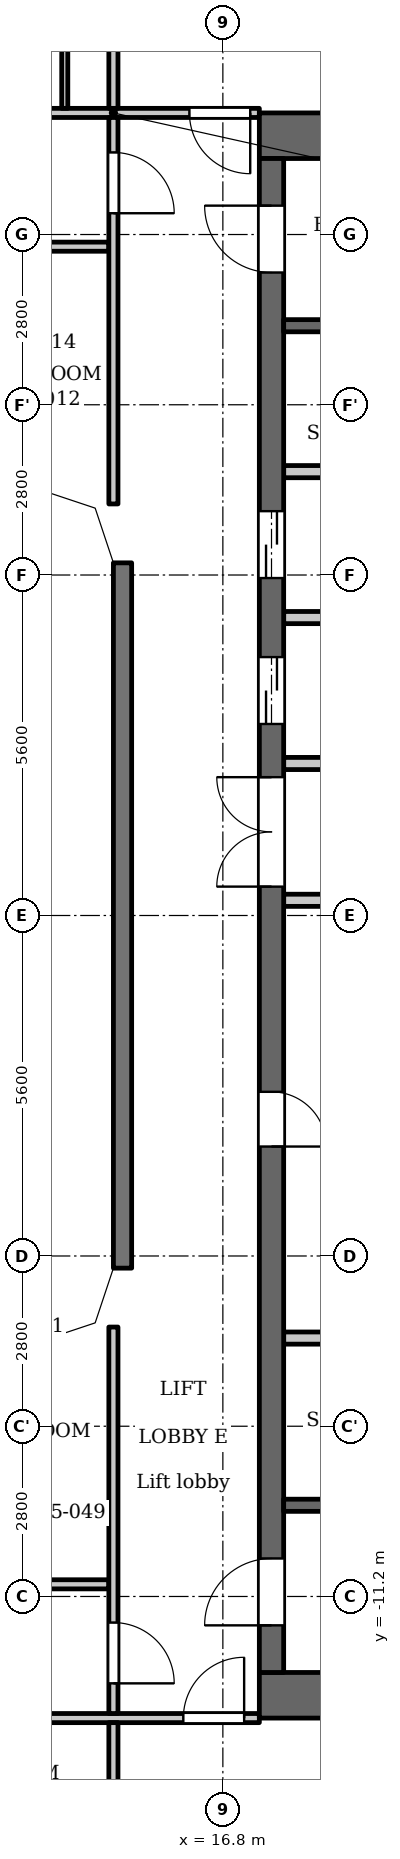
"""IFC4 building model, lengths in metres.
Left out: names, types, materials, properties, quantities, classifications, styles, units other than length and angle.
Written with IfcOpenShell. Run it as: python <this file> out.ifc"""

import sys

from ifc_helpers import new_model, si_unit, direction, frame, frame_2d, origin, place, context, subcontext, project, spatial, polyline, rectangle, outline, extrude, element, fill, save


model = new_model("IFC4")
c1 = context("Model", 3, precision=1e-05, world=origin(), true_north=direction((0.0, 1.0)))
c2 = subcontext(c1, "Body", "Model", "MODEL_VIEW")
j1 = project(units=[si_unit("LENGTHUNIT", "METRE"), si_unit("PLANEANGLEUNIT", "RADIAN")], contexts=[c1])
p1 = place(None, origin())
s1 = spatial("IfcSite", under=j1, at=p1, CompositionType="ELEMENT")
p2 = place(p1, origin())
s2 = spatial("IfcBuilding", under=s1, at=p2, CompositionType="ELEMENT")
p3 = place(p2, frame((0.0, 0.0, 174.6)))
s3 = spatial("IfcBuildingStorey", under=s2, at=p3, CompositionType="ELEMENT", Elevation=174.6)
p4 = place(p3, frame((15.15, 5.8, 0.0), z_axis=(0.0, 0.0, 1.0), x_axis=(0.0, -1.0, 0.0)))
e1 = element("IfcWall", 1, at=p4, inside=s3, PredefinedType="SOLIDWALL", context=c2, shape_type="SweptSolid", body=[
    extrude(rectangle(XDim=11.6, YDim=0.3, at=frame_2d((5.8, 0.0))), origin(), (0.0, 0.0, 1.0), 3.15),
])
for number, where, z_axis, x_axis in (
    (2, (17.4, 12.825, 0.0), (0.0, 0.0, 1.0), (1.0, 0.0, 0.0)),
    (3, (17.4, -12.825, 0.0), (0.0, 0.0, 1.0), (1.0, 0.0, 0.0)),
):
    element("IfcWall", number, at=place(p3, frame(where, z_axis=z_axis, x_axis=x_axis)), inside=s3, PredefinedType="SHEAR", context=c2, shape_type="SweptSolid", body=[
        extrude(rectangle(XDim=10.4, YDim=0.75, at=frame_2d((5.2, 0.0))), origin(), (0.0, 0.0, 1.0), 3.15),
    ])
p5 = place(p3, frame((17.6, -12.45, 0.0), z_axis=(0.0, 0.0, 1.0), x_axis=(0.0, 1.0, 0.0)))
e4 = element("IfcWall", 4, at=p5, inside=s3, PredefinedType="SHEAR", context=c2, shape_type="SweptSolid", body=[
    extrude(rectangle(XDim=24.9, YDim=0.4, at=frame_2d((12.45, 0.0))), origin(), (0.0, 0.0, 1.0), 3.15),
])
p6 = place(p5, frame((8.65, 0.0, 0.0)))
e5 = element("IfcOpeningElement", 5, at=p6, cuts=e4, PredefinedType="OPENING", context=c2, shape_type="SweptSolid", body=[
    extrude(rectangle(XDim=0.9, YDim=2.1, at=frame_2d((0.45, 1.05))), frame((0.0, 0.21, 0.0), z_axis=(0.0, -1.0, 0.0), x_axis=(1.0, 0.0, 0.0)), (0.0, 0.0, 1.0), 0.42),
])
p7 = place(p5, frame((15.6, 0.0, 0.0)))
e6 = element("IfcOpeningElement", 6, at=p7, cuts=e4, PredefinedType="OPENING", context=c2, shape_type="SweptSolid", body=[
    extrude(rectangle(XDim=1.1, YDim=2.1, at=frame_2d((0.55, 1.05))), frame((0.0, 0.21, 0.0), z_axis=(0.0, -1.0, 0.0), x_axis=(1.0, 0.0, 0.0)), (0.0, 0.0, 1.0), 0.42),
])
p8 = place(p5, frame((18.0, 0.0, 0.0)))
e7 = element("IfcOpeningElement", 7, at=p8, cuts=e4, PredefinedType="OPENING", context=c2, shape_type="SweptSolid", body=[
    extrude(rectangle(XDim=1.1, YDim=2.1, at=frame_2d((0.55, 1.05))), frame((0.0, 0.21, 0.0), z_axis=(0.0, -1.0, 0.0), x_axis=(1.0, 0.0, 0.0)), (0.0, 0.0, 1.0), 0.42),
])
p9 = place(p5, frame((23.025, 0.0, 0.0)))
e8 = element("IfcOpeningElement", 8, at=p9, cuts=e4, PredefinedType="OPENING", context=c2, shape_type="SweptSolid", body=[
    extrude(rectangle(XDim=1.1, YDim=2.1, at=frame_2d((0.55, 1.05))), frame((0.0, 0.21, 0.0), z_axis=(0.0, -1.0, 0.0), x_axis=(1.0, 0.0, 0.0)), (0.0, 0.0, 1.0), 0.42),
])
p10 = place(p5, frame((0.775, 0.0, 0.0)))
e9 = element("IfcOpeningElement", 9, at=p10, cuts=e4, PredefinedType="OPENING", context=c2, shape_type="SweptSolid", body=[
    extrude(rectangle(XDim=1.1, YDim=2.1, at=frame_2d((0.55, 1.05))), frame((0.0, 0.21, 0.0), z_axis=(0.0, -1.0, 0.0), x_axis=(1.0, 0.0, 0.0)), (0.0, 0.0, 1.0), 0.42),
])
p11 = place(p5, frame((12.925, 0.0, 0.0)))
e10 = element("IfcOpeningElement", 10, at=p11, cuts=e4, PredefinedType="OPENING", context=c2, shape_type="SweptSolid", body=[
    extrude(rectangle(XDim=1.8, YDim=2.1, at=frame_2d((0.9, 1.05))), frame((0.0, 0.21, 0.0), z_axis=(0.0, -1.0, 0.0), x_axis=(1.0, 0.0, 0.0)), (0.0, 0.0, 1.0), 0.42),
])
p12 = place(p3, frame((17.8, -9.7, 0.0), z_axis=(0.0, 0.0, 1.0), x_axis=(1.0, 0.0, 0.0)))
e11 = element("IfcWall", 11, at=p12, inside=s3, PredefinedType="SHEAR", context=c2, shape_type="SweptSolid", body=[
    extrude(rectangle(XDim=8.45, YDim=0.2, at=frame_2d((4.225, 0.0))), origin(), (0.0, 0.0, 1.0), 3.15),
])
p13 = place(p12, frame((0.85, 0.0, 0.0)))
e12 = element("IfcOpeningElement", 12, at=p13, cuts=e11, PredefinedType="OPENING", context=c2, shape_type="SweptSolid", body=[
    extrude(rectangle(XDim=1.1, YDim=2.1, at=frame_2d((0.55, 1.05))), frame((0.0, 0.11, 0.0), z_axis=(0.0, -1.0, 0.0), x_axis=(1.0, 0.0, 0.0)), (0.0, 0.0, 1.0), 0.22),
])
p14 = place(p12, frame((3.75, 0.0, 0.0)))
e13 = element("IfcOpeningElement", 13, at=p14, cuts=e11, PredefinedType="OPENING", context=c2, shape_type="SweptSolid", body=[
    extrude(rectangle(XDim=1.1, YDim=2.1, at=frame_2d((0.55, 1.05))), frame((0.0, 0.11, 0.0), z_axis=(0.0, -1.0, 0.0), x_axis=(1.0, 0.0, 0.0)), (0.0, 0.0, 1.0), 0.22),
])
p15 = place(p3, frame((17.8, -6.95, 0.0), z_axis=(0.0, 0.0, 1.0), x_axis=(1.0, 0.0, 0.0)))
e14 = element("IfcWall", 14, at=p15, inside=s3, PredefinedType="PARTITIONING", context=c2, shape_type="SweptSolid", body=[
    extrude(rectangle(XDim=2.8, YDim=0.2, at=frame_2d((1.4, 0.0))), origin(), (0.0, 0.0, 1.0), 3.15),
])
p16 = place(p3, frame((17.8, 0.25, 0.0), z_axis=(0.0, 0.0, 1.0), x_axis=(1.0, 0.0, 0.0)))
e15 = element("IfcWall", 15, at=p16, inside=s3, PredefinedType="PARTITIONING", context=c2, shape_type="SweptSolid", body=[
    extrude(rectangle(XDim=3.0, YDim=0.2, at=frame_2d((1.5, 0.0))), origin(), (0.0, 0.0, 1.0), 3.15),
])
p17 = place(p16, frame((1.98, 0.0, 0.0)))
e16 = element("IfcOpeningElement", 16, at=p17, cuts=e15, PredefinedType="OPENING", context=c2, shape_type="SweptSolid", body=[
    extrude(rectangle(XDim=0.9, YDim=2.1, at=frame_2d((0.45, 1.05))), frame((0.0, 0.11, 0.0), z_axis=(0.0, -1.0, 0.0), x_axis=(1.0, 0.0, 0.0)), (0.0, 0.0, 1.0), 0.22),
])
p18 = place(p3, frame((17.8, 2.5, 0.0), z_axis=(0.0, 0.0, 1.0), x_axis=(1.0, 0.0, 0.0)))
e17 = element("IfcWall", 17, at=p18, inside=s3, PredefinedType="PARTITIONING", context=c2, shape_type="SweptSolid", body=[
    extrude(rectangle(XDim=3.0, YDim=0.2, at=frame_2d((1.5, 0.0))), origin(), (0.0, 0.0, 1.0), 3.15),
])
for number, where, z_axis, x_axis in (
    (18, (17.8, 4.9, 0.0), (0.0, 0.0, 1.0), (1.0, 0.0, 0.0)),
    (19, (17.8, 7.3, 0.0), (0.0, 0.0, 1.0), (1.0, 0.0, 0.0)),
):
    element("IfcWall", number, at=place(p3, frame(where, z_axis=z_axis, x_axis=x_axis)), inside=s3, PredefinedType="PARTITIONING", context=c2, shape_type="SweptSolid", body=[
        extrude(rectangle(XDim=2.8, YDim=0.2, at=frame_2d((1.4, 0.0))), origin(), (0.0, 0.0, 1.0), 3.15),
    ])
p19 = place(p3, frame((17.8, 9.7, 0.0), z_axis=(0.0, 0.0, 1.0), x_axis=(1.0, 0.0, 0.0)))
e20 = element("IfcWall", 20, at=p19, inside=s3, PredefinedType="SHEAR", context=c2, shape_type="SweptSolid", body=[
    extrude(rectangle(XDim=8.45, YDim=0.2, at=frame_2d((4.225, 0.0))), origin(), (0.0, 0.0, 1.0), 3.15),
])
p20 = place(p19, frame((0.85, 0.0, 0.0)))
e21 = element("IfcOpeningElement", 21, at=p20, cuts=e20, PredefinedType="OPENING", context=c2, shape_type="SweptSolid", body=[
    extrude(rectangle(XDim=1.1, YDim=2.1, at=frame_2d((0.55, 1.05))), frame((0.0, 0.11, 0.0), z_axis=(0.0, -1.0, 0.0), x_axis=(1.0, 0.0, 0.0)), (0.0, 0.0, 1.0), 0.22),
])
p21 = place(p19, frame((3.75, 0.0, 0.0)))
e22 = element("IfcOpeningElement", 22, at=p21, cuts=e20, PredefinedType="OPENING", context=c2, shape_type="SweptSolid", body=[
    extrude(rectangle(XDim=1.1, YDim=2.1, at=frame_2d((0.55, 1.05))), frame((0.0, 0.11, 0.0), z_axis=(0.0, -1.0, 0.0), x_axis=(1.0, 0.0, 0.0)), (0.0, 0.0, 1.0), 0.22),
])
p22 = place(p3, frame((-17.4, -13.2, 0.0), z_axis=(0.0, 0.0, 1.0), x_axis=(1.0, 0.0, 0.0)))
e23 = element("IfcWall", 23, at=p22, inside=s3, PredefinedType="PARTITIONING", context=c2, shape_type="SweptSolid", body=[
    extrude(rectangle(XDim=34.8, YDim=0.15, at=frame_2d((17.4, 0.0))), origin(), (0.0, 0.0, 1.0), 3.15),
])
p23 = place(p22, frame((0.15, 0.0, 0.0)))
e24 = element("IfcOpeningElement", 24, at=p23, cuts=e23, PredefinedType="OPENING", context=c2, shape_type="SweptSolid", body=[
    extrude(rectangle(XDim=1.0, YDim=2.1, at=frame_2d((0.5, 1.05))), frame((0.0, 0.085, 0.0), z_axis=(0.0, -1.0, 0.0), x_axis=(1.0, 0.0, 0.0)), (0.0, 0.0, 1.0), 0.17),
])
p24 = place(p22, frame((33.55, 0.0, 0.0)))
e25 = element("IfcOpeningElement", 25, at=p24, cuts=e23, PredefinedType="OPENING", context=c2, shape_type="SweptSolid", body=[
    extrude(rectangle(XDim=1.0, YDim=2.1, at=frame_2d((0.5, 1.05))), frame((0.0, 0.085, 0.0), z_axis=(0.0, -1.0, 0.0), x_axis=(1.0, 0.0, 0.0)), (0.0, 0.0, 1.0), 0.17),
])
p25 = place(p22, frame((15.7, 0.0, 0.0)))
e26 = element("IfcOpeningElement", 26, at=p25, cuts=e23, PredefinedType="OPENING", context=c2, shape_type="SweptSolid", body=[
    extrude(rectangle(XDim=1.0, YDim=2.1, at=frame_2d((0.5, 1.05))), frame((0.0, 0.085, 0.0), z_axis=(0.0, -1.0, 0.0), x_axis=(1.0, 0.0, 0.0)), (0.0, 0.0, 1.0), 0.17),
])
p26 = place(p22, frame((26.9, 0.0, 0.0)))
e27 = element("IfcOpeningElement", 27, at=p26, cuts=e23, PredefinedType="OPENING", context=c2, shape_type="SweptSolid", body=[
    extrude(rectangle(XDim=1.0, YDim=2.1, at=frame_2d((0.5, 1.05))), frame((0.0, 0.085, 0.0), z_axis=(0.0, -1.0, 0.0), x_axis=(1.0, 0.0, 0.0)), (0.0, 0.0, 1.0), 0.17),
])
p27 = place(p3, frame((-14.925, -11.0, 0.0), z_axis=(0.0, 0.0, 1.0), x_axis=(1.0, 0.0, 0.0)))
e28 = element("IfcWall", 28, at=p27, inside=s3, PredefinedType="PARTITIONING", context=c2, shape_type="SweptSolid", body=[
    extrude(rectangle(XDim=29.85, YDim=0.15, at=frame_2d((14.925, 0.0))), origin(), (0.0, 0.0, 1.0), 3.15),
])
p28 = place(p27, frame((9.875, 0.0, 0.0)))
e29 = element("IfcOpeningElement", 29, at=p28, cuts=e28, PredefinedType="OPENING", context=c2, shape_type="SweptSolid", body=[
    extrude(rectangle(XDim=1.0, YDim=2.1, at=frame_2d((0.5, 1.05))), frame((0.0, 0.085, 0.0), z_axis=(0.0, -1.0, 0.0), x_axis=(1.0, 0.0, 0.0)), (0.0, 0.0, 1.0), 0.17),
])
p29 = place(p27, frame((17.875, 0.0, 0.0)))
e30 = element("IfcOpeningElement", 30, at=p29, cuts=e28, PredefinedType="OPENING", context=c2, shape_type="SweptSolid", body=[
    extrude(rectangle(XDim=1.0, YDim=2.1, at=frame_2d((0.5, 1.05))), frame((0.0, 0.085, 0.0), z_axis=(0.0, -1.0, 0.0), x_axis=(1.0, 0.0, 0.0)), (0.0, 0.0, 1.0), 0.17),
])
p30 = place(p3, frame((-14.925, 11.0, 0.0), z_axis=(0.0, 0.0, 1.0), x_axis=(1.0, 0.0, 0.0)))
e31 = element("IfcWall", 31, at=p30, inside=s3, PredefinedType="PARTITIONING", context=c2, shape_type="SweptSolid", body=[
    extrude(rectangle(XDim=29.85, YDim=0.15, at=frame_2d((14.925, 0.0))), origin(), (0.0, 0.0, 1.0), 3.15),
])
p31 = place(p30, frame((2.475, 0.0, 0.0)))
e32 = element("IfcOpeningElement", 32, at=p31, cuts=e31, PredefinedType="OPENING", context=c2, shape_type="SweptSolid", body=[
    extrude(rectangle(XDim=1.0, YDim=2.1, at=frame_2d((0.5, 1.05))), frame((0.0, 0.085, 0.0), z_axis=(0.0, -1.0, 0.0), x_axis=(1.0, 0.0, 0.0)), (0.0, 0.0, 1.0), 0.17),
])
p32 = place(p30, frame((26.275, 0.0, 0.0)))
e33 = element("IfcOpeningElement", 33, at=p32, cuts=e31, PredefinedType="OPENING", context=c2, shape_type="SweptSolid", body=[
    extrude(rectangle(XDim=1.0, YDim=2.1, at=frame_2d((0.5, 1.05))), frame((0.0, 0.085, 0.0), z_axis=(0.0, -1.0, 0.0), x_axis=(1.0, 0.0, 0.0)), (0.0, 0.0, 1.0), 0.17),
])
p33 = place(p3, frame((-17.4, 13.2, 0.0), z_axis=(0.0, 0.0, 1.0), x_axis=(1.0, 0.0, 0.0)))
e34 = element("IfcWall", 34, at=p33, inside=s3, PredefinedType="PARTITIONING", context=c2, shape_type="SweptSolid", body=[
    extrude(rectangle(XDim=34.8, YDim=0.15, at=frame_2d((17.4, 0.0))), origin(), (0.0, 0.0, 1.0), 3.15),
])
p34 = place(p33, frame((0.25, 0.0, 0.0)))
e35 = element("IfcOpeningElement", 35, at=p34, cuts=e34, PredefinedType="OPENING", context=c2, shape_type="SweptSolid", body=[
    extrude(rectangle(XDim=1.0, YDim=2.1, at=frame_2d((0.5, 1.05))), frame((0.0, 0.085, 0.0), z_axis=(0.0, -1.0, 0.0), x_axis=(1.0, 0.0, 0.0)), (0.0, 0.0, 1.0), 0.17),
])
p35 = place(p33, frame((33.65, 0.0, 0.0)))
e36 = element("IfcOpeningElement", 36, at=p35, cuts=e34, PredefinedType="OPENING", context=c2, shape_type="SweptSolid", body=[
    extrude(rectangle(XDim=1.0, YDim=2.1, at=frame_2d((0.5, 1.05))), frame((0.0, 0.085, 0.0), z_axis=(0.0, -1.0, 0.0), x_axis=(1.0, 0.0, 0.0)), (0.0, 0.0, 1.0), 0.17),
])
p36 = place(p33, frame((10.15, 0.0, 0.0)))
e37 = element("IfcOpeningElement", 37, at=p36, cuts=e34, PredefinedType="OPENING", context=c2, shape_type="SweptSolid", body=[
    extrude(rectangle(XDim=1.0, YDim=2.1, at=frame_2d((0.5, 1.05))), frame((0.0, 0.085, 0.0), z_axis=(0.0, -1.0, 0.0), x_axis=(1.0, 0.0, 0.0)), (0.0, 0.0, 1.0), 0.17),
])
p37 = place(p33, frame((15.75, 0.0, 0.0)))
e38 = element("IfcOpeningElement", 38, at=p37, cuts=e34, PredefinedType="OPENING", context=c2, shape_type="SweptSolid", body=[
    extrude(rectangle(XDim=1.0, YDim=2.1, at=frame_2d((0.5, 1.05))), frame((0.0, 0.085, 0.0), z_axis=(0.0, -1.0, 0.0), x_axis=(1.0, 0.0, 0.0)), (0.0, 0.0, 1.0), 0.17),
])
p38 = place(p33, frame((24.95, 0.0, 0.0)))
e39 = element("IfcOpeningElement", 39, at=p38, cuts=e34, PredefinedType="OPENING", context=c2, shape_type="SweptSolid", body=[
    extrude(rectangle(XDim=1.0, YDim=2.1, at=frame_2d((0.5, 1.05))), frame((0.0, 0.085, 0.0), z_axis=(0.0, -1.0, 0.0), x_axis=(1.0, 0.0, 0.0)), (0.0, 0.0, 1.0), 0.17),
])
p39 = place(p33, frame((29.95, 0.0, 0.0)))
e40 = element("IfcOpeningElement", 40, at=p39, cuts=e34, PredefinedType="OPENING", context=c2, shape_type="SweptSolid", body=[
    extrude(rectangle(XDim=1.0, YDim=2.1, at=frame_2d((0.5, 1.05))), frame((0.0, 0.085, 0.0), z_axis=(0.0, -1.0, 0.0), x_axis=(1.0, 0.0, 0.0)), (0.0, 0.0, 1.0), 0.17),
])
p40 = place(p3, frame((14.2, 13.275, 0.0), z_axis=(0.0, 0.0, 1.0), x_axis=(0.0, 1.0, 0.0)))
e41 = element("IfcWall", 41, at=p40, inside=s3, PredefinedType="PARTITIONING", context=c2, shape_type="SweptSolid", body=[
    extrude(rectangle(XDim=3.175, YDim=0.1, at=frame_2d((1.587, 0.0))), origin(), (0.0, 0.0, 1.0), 3.15),
])
p41 = place(p3, frame((15.0, -15.325, 0.0), z_axis=(0.0, 0.0, 1.0), x_axis=(0.0, 1.0, 0.0)))
e42 = element("IfcWall", 42, at=p41, inside=s3, PredefinedType="PARTITIONING", context=c2, shape_type="SweptSolid", body=[
    extrude(rectangle(XDim=2.05, YDim=0.15, at=frame_2d((1.025, 0.0))), origin(), (0.0, 0.0, 1.0), 3.15),
])
p42 = place(p3, frame((15.0, -13.125, 0.0), z_axis=(0.0, 0.0, 1.0), x_axis=(0.0, 1.0, 0.0)))
e43 = element("IfcWall", 43, at=p42, inside=s3, PredefinedType="PARTITIONING", context=c2, shape_type="SweptSolid", body=[
    extrude(rectangle(XDim=6.356, YDim=0.15, at=frame_2d((3.178, 0.0))), origin(), (0.0, 0.0, 1.0), 3.15),
])
p43 = place(p42, frame((0.496, 0.0, 0.0)))
e44 = element("IfcOpeningElement", 44, at=p43, cuts=e43, PredefinedType="OPENING", context=c2, shape_type="SweptSolid", body=[
    extrude(rectangle(XDim=1.0, YDim=2.1, at=frame_2d((0.5, 1.05))), frame((0.0, 0.085, 0.0), z_axis=(0.0, -1.0, 0.0), x_axis=(1.0, 0.0, 0.0)), (0.0, 0.0, 1.0), 0.17),
])
p44 = place(p3, frame((15.0, 6.769, 0.0), z_axis=(0.0, 0.0, 1.0), x_axis=(0.0, 1.0, 0.0)))
e45 = element("IfcWall", 45, at=p44, inside=s3, PredefinedType="PARTITIONING", context=c2, shape_type="SweptSolid", body=[
    extrude(rectangle(XDim=6.356, YDim=0.15, at=frame_2d((3.178, 0.0))), origin(), (0.0, 0.0, 1.0), 3.15),
])
p45 = place(p44, frame((4.781, 0.0, 0.0)))
e46 = element("IfcOpeningElement", 46, at=p45, cuts=e45, PredefinedType="OPENING", context=c2, shape_type="SweptSolid", body=[
    extrude(rectangle(XDim=1.0, YDim=2.1, at=frame_2d((0.5, 1.05))), frame((0.0, 0.085, 0.0), z_axis=(0.0, -1.0, 0.0), x_axis=(1.0, 0.0, 0.0)), (0.0, 0.0, 1.0), 0.17),
])
p46 = place(p3, frame((15.0, 13.275, 0.0), z_axis=(0.0, 0.0, 1.0), x_axis=(0.0, 1.0, 0.0)))
e47 = element("IfcWall", 47, at=p46, inside=s3, PredefinedType="PARTITIONING", context=c2, shape_type="SweptSolid", body=[
    extrude(rectangle(XDim=2.05, YDim=0.15, at=frame_2d((1.025, 0.0))), origin(), (0.0, 0.0, 1.0), 3.15),
])
p47 = place(p3, origin())
e48 = element("IfcWall", 48, at=p47, inside=s3, PredefinedType="SOLIDWALL", context=c2, shape_type="SweptSolid", body=[
    extrude(outline(polyline([(14.937, 6.937), (13.849, 7.3), (13.8, 7.3), (13.8, 7.0), (14.7, 6.7), (15.0, 5.8), (15.3, 5.8), (15.3, 5.849), (14.937, 6.937)])), origin(), (0.0, 0.0, 1.0), 3.15),
])
e49 = element("IfcWall", 49, at=p47, inside=s3, PredefinedType="SOLIDWALL", context=c2, shape_type="SweptSolid", body=[
    extrude(outline(polyline([(14.937, -6.937), (15.3, -5.849), (15.3, -5.8), (15.0, -5.8), (14.7, -6.7), (13.8, -7.0), (13.8, -7.3), (13.849, -7.3), (14.937, -6.937)])), origin(), (0.0, 0.0, 1.0), 3.15),
])
p48 = place(p6, origin())
e50 = element("IfcDoor", 50, at=p48, inside=s3, OperationType="SINGLE_SWING_LEFT", PredefinedType="DOOR", context=c2, shape_type="SweptSolid", body=[
    extrude(rectangle(XDim=0.9, YDim=2.1, at=frame_2d((0.45, 1.05))), frame((0.0, 0.025, 0.0), z_axis=(0.0, -1.0, 0.0), x_axis=(1.0, 0.0, 0.0)), (0.0, 0.0, 1.0), 0.05),
])
fill(e5, e50)
p49 = place(p7, origin())
e51 = element("IfcDoor", 51, at=p49, inside=s3, OperationType="DOUBLE_DOOR_SLIDING", PredefinedType="DOOR", context=c2, shape_type="SweptSolid", body=[
    extrude(rectangle(XDim=1.1, YDim=2.1, at=frame_2d((0.55, 1.05))), frame((0.0, 0.025, 0.0), z_axis=(0.0, -1.0, 0.0), x_axis=(1.0, 0.0, 0.0)), (0.0, 0.0, 1.0), 0.05),
])
fill(e6, e51)
p50 = place(p8, origin())
e52 = element("IfcDoor", 52, at=p50, inside=s3, OperationType="DOUBLE_DOOR_SLIDING", PredefinedType="DOOR", context=c2, shape_type="SweptSolid", body=[
    extrude(rectangle(XDim=1.1, YDim=2.1, at=frame_2d((0.55, 1.05))), frame((0.0, 0.025, 0.0), z_axis=(0.0, -1.0, 0.0), x_axis=(1.0, 0.0, 0.0)), (0.0, 0.0, 1.0), 0.05),
])
fill(e7, e52)
p51 = place(p9, origin())
e53 = element("IfcDoor", 53, at=p51, inside=s3, OperationType="SINGLE_SWING_LEFT", PredefinedType="DOOR", context=c2, shape_type="SweptSolid", body=[
    extrude(rectangle(XDim=1.1, YDim=2.1, at=frame_2d((0.55, 1.05))), frame((0.0, 0.025, 0.0), z_axis=(0.0, -1.0, 0.0), x_axis=(1.0, 0.0, 0.0)), (0.0, 0.0, 1.0), 0.05),
])
fill(e8, e53)
p52 = place(p10, origin())
e54 = element("IfcDoor", 54, at=p52, inside=s3, OperationType="SINGLE_SWING_RIGHT", PredefinedType="DOOR", context=c2, shape_type="SweptSolid", body=[
    extrude(rectangle(XDim=1.1, YDim=2.1, at=frame_2d((0.55, 1.05))), frame((0.0, 0.025, 0.0), z_axis=(0.0, -1.0, 0.0), x_axis=(1.0, 0.0, 0.0)), (0.0, 0.0, 1.0), 0.05),
])
fill(e9, e54)
p53 = place(p11, origin())
e55 = element("IfcDoor", 55, at=p53, inside=s3, OperationType="DOUBLE_DOOR_SINGLE_SWING", PredefinedType="DOOR", context=c2, shape_type="SweptSolid", body=[
    extrude(rectangle(XDim=1.8, YDim=2.1, at=frame_2d((0.9, 1.05))), frame((0.0, 0.025, 0.0), z_axis=(0.0, -1.0, 0.0), x_axis=(1.0, 0.0, 0.0)), (0.0, 0.0, 1.0), 0.05),
])
fill(e10, e55)
p54 = place(p45, origin())
e56 = element("IfcDoor", 56, at=p54, inside=s3, OperationType="SINGLE_SWING_LEFT", PredefinedType="DOOR", context=c2, shape_type="SweptSolid", body=[
    extrude(rectangle(XDim=1.0, YDim=2.1, at=frame_2d((0.5, 1.05))), frame((0.0, 0.025, 0.0), z_axis=(0.0, -1.0, 0.0), x_axis=(1.0, 0.0, 0.0)), (0.0, 0.0, 1.0), 0.05),
])
fill(e46, e56)
p55 = place(p35, origin())
e57 = element("IfcDoor", 57, at=p55, inside=s3, OperationType="SINGLE_SWING_RIGHT", PredefinedType="DOOR", context=c2, shape_type="SweptSolid", body=[
    extrude(rectangle(XDim=1.0, YDim=2.1, at=frame_2d((0.5, 1.05))), frame((0.0, 0.025, 0.0), z_axis=(0.0, -1.0, 0.0), x_axis=(1.0, 0.0, 0.0)), (0.0, 0.0, 1.0), 0.05),
])
fill(e36, e57)
p56 = place(p43, origin())
e58 = element("IfcDoor", 58, at=p56, inside=s3, OperationType="SINGLE_SWING_LEFT", PredefinedType="DOOR", context=c2, shape_type="SweptSolid", body=[
    extrude(rectangle(XDim=1.0, YDim=2.1, at=frame_2d((0.5, 1.05))), frame((0.0, 0.025, 0.0), z_axis=(0.0, -1.0, 0.0), x_axis=(1.0, 0.0, 0.0)), (0.0, 0.0, 1.0), 0.05),
])
fill(e44, e58)
p57 = place(p24, origin())
e59 = element("IfcDoor", 59, at=p57, inside=s3, OperationType="SINGLE_SWING_LEFT", PredefinedType="DOOR", context=c2, shape_type="SweptSolid", body=[
    extrude(rectangle(XDim=1.0, YDim=2.1, at=frame_2d((0.5, 1.05))), frame((0.0, 0.025, 0.0), z_axis=(0.0, -1.0, 0.0), x_axis=(1.0, 0.0, 0.0)), (0.0, 0.0, 1.0), 0.05),
])
fill(e25, e59)
save(model, sys.argv[1])
